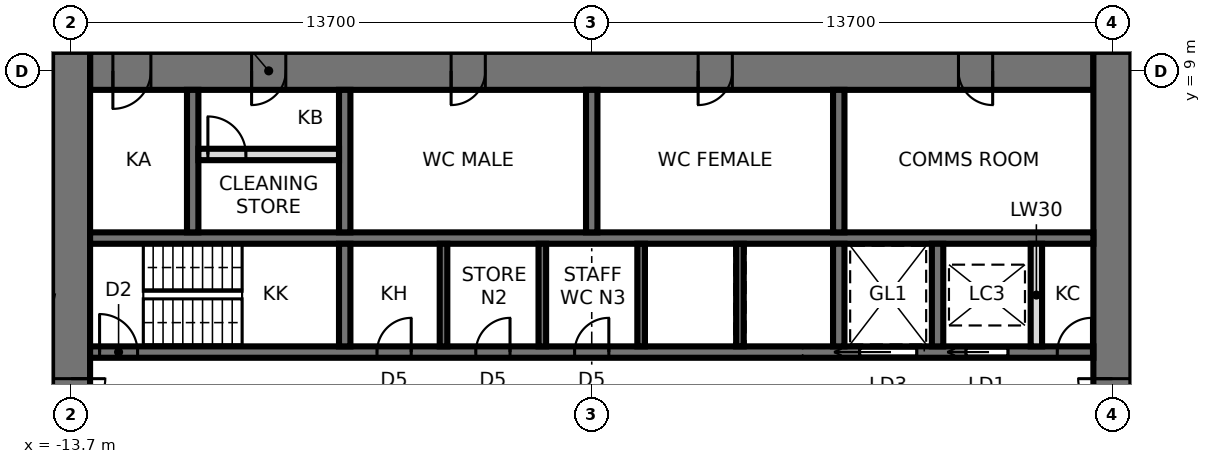
"""IFC4 building model, lengths in metres.
Left out: names, types, materials, properties, quantities, classifications, styles, units other than length and angle.
Written with IfcOpenShell. Run it as: python <this file> out.ifc"""

import sys

from ifc_helpers import new_model, si_unit, direction, frame, frame_2d, origin, place, context, subcontext, project, spatial, rectangle, extrude, element, fill, save


model = new_model("IFC4")
c1 = context("Model", 3, precision=1e-05, world=origin(), true_north=direction((0.0, 1.0)))
c2 = subcontext(c1, "Body", "Model", "MODEL_VIEW")
j1 = project(units=[si_unit("LENGTHUNIT", "METRE"), si_unit("PLANEANGLEUNIT", "RADIAN")], contexts=[c1])
p1 = place(None, origin())
s1 = spatial("IfcSite", under=j1, at=p1, CompositionType="ELEMENT")
p2 = place(p1, origin())
s2 = spatial("IfcBuilding", under=s1, at=p2, CompositionType="ELEMENT")
p3 = place(p2, frame((0.0, 0.0, 215.0)))
s3 = spatial("IfcBuildingStorey", under=s2, at=p3, CompositionType="ELEMENT", Elevation=215.0)
p4 = place(p3, frame((13.2, 9.0, 0.0), z_axis=(0.0, 0.0, 1.0), x_axis=(-1.0, 0.0, 0.0)))
e1 = element("IfcWall", 1, at=p4, inside=s3, PredefinedType="SHEAR", context=c2, shape_type="SweptSolid", body=[
    extrude(rectangle(XDim=26.4, YDim=1.0, at=frame_2d((13.2, 0.0))), origin(), (0.0, 0.0, 1.0), 3.9),
])
p5 = place(p4, frame((2.65, 0.0, 0.0)))
e2 = element("IfcOpeningElement", 2, at=p5, cuts=e1, PredefinedType="OPENING", context=c2, shape_type="SweptSolid", body=[
    extrude(rectangle(XDim=0.9, YDim=2.1, at=frame_2d((0.45, 1.05))), frame((0.0, 0.51, 0.0), z_axis=(0.0, -1.0, 0.0), x_axis=(1.0, 0.0, 0.0)), (0.0, 0.0, 1.0), 1.02),
])
p6 = place(p4, frame((9.5, 0.0, 0.0)))
e3 = element("IfcOpeningElement", 3, at=p6, cuts=e1, PredefinedType="OPENING", context=c2, shape_type="SweptSolid", body=[
    extrude(rectangle(XDim=0.9, YDim=2.1, at=frame_2d((0.45, 1.05))), frame((0.0, 0.51, 0.0), z_axis=(0.0, -1.0, 0.0), x_axis=(1.0, 0.0, 0.0)), (0.0, 0.0, 1.0), 1.02),
])
p7 = place(p4, frame((16.0, 0.0, 0.0)))
e4 = element("IfcOpeningElement", 4, at=p7, cuts=e1, PredefinedType="OPENING", context=c2, shape_type="SweptSolid", body=[
    extrude(rectangle(XDim=0.9, YDim=2.1, at=frame_2d((0.45, 1.05))), frame((0.0, 0.51, 0.0), z_axis=(0.0, -1.0, 0.0), x_axis=(1.0, 0.0, 0.0)), (0.0, 0.0, 1.0), 1.02),
])
p8 = place(p4, frame((21.25, 0.0, 0.0)))
e5 = element("IfcOpeningElement", 5, at=p8, cuts=e1, PredefinedType="OPENING", context=c2, shape_type="SweptSolid", body=[
    extrude(rectangle(XDim=0.9, YDim=2.1, at=frame_2d((0.45, 1.05))), frame((0.0, 0.51, 0.0), z_axis=(0.0, -1.0, 0.0), x_axis=(1.0, 0.0, 0.0)), (0.0, 0.0, 1.0), 1.02),
])
p9 = place(p4, frame((24.8, 0.0, 0.0)))
e6 = element("IfcOpeningElement", 6, at=p9, cuts=e1, PredefinedType="OPENING", context=c2, shape_type="SweptSolid", body=[
    extrude(rectangle(XDim=1.0, YDim=2.1, at=frame_2d((0.5, 1.05))), frame((0.0, 0.51, 0.0), z_axis=(0.0, -1.0, 0.0), x_axis=(1.0, 0.0, 0.0)), (0.0, 0.0, 1.0), 1.02),
])
p10 = place(p3, frame((13.7, -9.5, 0.0), z_axis=(0.0, 0.0, 1.0), x_axis=(0.0, 1.0, 0.0)))
e7 = element("IfcWall", 7, at=p10, inside=s3, PredefinedType="SHEAR", context=c2, shape_type="SweptSolid", body=[
    extrude(rectangle(XDim=19.0, YDim=1.0, at=frame_2d((9.5, 0.0))), origin(), (0.0, 0.0, 1.0), 3.9),
])
p11 = place(p10, frame((8.6, 0.0, 0.0)))
e8 = element("IfcOpeningElement", 8, at=p11, cuts=e7, PredefinedType="OPENING", context=c2, shape_type="SweptSolid", body=[
    extrude(rectangle(XDim=1.8, YDim=2.4, at=frame_2d((0.9, 1.2))), frame((0.0, 0.51, 0.0), z_axis=(0.0, -1.0, 0.0), x_axis=(1.0, 0.0, 0.0)), (0.0, 0.0, 1.0), 1.02),
])
p12 = place(p3, frame((-13.7, 9.5, 0.0), z_axis=(0.0, 0.0, 1.0), x_axis=(0.0, -1.0, 0.0)))
e9 = element("IfcWall", 9, at=p12, inside=s3, PredefinedType="SHEAR", context=c2, shape_type="SweptSolid", body=[
    extrude(rectangle(XDim=19.0, YDim=1.0, at=frame_2d((9.5, 0.0))), origin(), (0.0, 0.0, 1.0), 3.9),
])
p13 = place(p12, frame((8.6, 0.0, 0.0)))
e10 = element("IfcOpeningElement", 10, at=p13, cuts=e9, PredefinedType="OPENING", context=c2, shape_type="SweptSolid", body=[
    extrude(rectangle(XDim=1.8, YDim=2.4, at=frame_2d((0.9, 1.2))), frame((0.0, 0.51, 0.0), z_axis=(0.0, -1.0, 0.0), x_axis=(1.0, 0.0, 0.0)), (0.0, 0.0, 1.0), 1.02),
])
p14 = place(p3, frame((-13.2, 1.6, 0.0), z_axis=(0.0, 0.0, 1.0), x_axis=(1.0, 0.0, 0.0)))
e11 = element("IfcWall", 11, at=p14, inside=s3, PredefinedType="SHEAR", context=c2, shape_type="SweptSolid", body=[
    extrude(rectangle(XDim=26.4, YDim=0.3, at=frame_2d((13.2, 0.0))), origin(), (0.0, 0.0, 1.0), 3.9),
])
p15 = place(p14, frame((0.25, 0.0, 0.0)))
e12 = element("IfcOpeningElement", 12, at=p15, cuts=e11, PredefinedType="OPENING", context=c2, shape_type="SweptSolid", body=[
    extrude(rectangle(XDim=1.0, YDim=2.1, at=frame_2d((0.5, 1.05))), frame((0.0, 0.16, 0.0), z_axis=(0.0, -1.0, 0.0), x_axis=(1.0, 0.0, 0.0)), (0.0, 0.0, 1.0), 0.32),
])
p16 = place(p14, frame((23.05, 0.0, 0.0)))
e13 = element("IfcOpeningElement", 13, at=p16, cuts=e11, PredefinedType="OPENING", context=c2, shape_type="SweptSolid", body=[
    extrude(rectangle(XDim=1.1, YDim=2.3, at=frame_2d((0.55, 1.15))), frame((0.0, 0.16, 0.0), z_axis=(0.0, -1.0, 0.0), x_axis=(1.0, 0.0, 0.0)), (0.0, 0.0, 1.0), 0.32),
])
p17 = place(p14, frame((20.25, 0.0, 0.0)))
e14 = element("IfcOpeningElement", 14, at=p17, cuts=e11, PredefinedType="OPENING", context=c2, shape_type="SweptSolid", body=[
    extrude(rectangle(XDim=1.5, YDim=2.4, at=frame_2d((0.75, 1.2))), frame((0.0, 0.16, 0.0), z_axis=(0.0, -1.0, 0.0), x_axis=(1.0, 0.0, 0.0)), (0.0, 0.0, 1.0), 0.32),
])
p18 = place(p14, frame((7.55, 0.0, 0.0)))
e15 = element("IfcOpeningElement", 15, at=p18, cuts=e11, PredefinedType="OPENING", context=c2, shape_type="SweptSolid", body=[
    extrude(rectangle(XDim=0.9, YDim=2.1, at=frame_2d((0.45, 1.05))), frame((0.0, 0.16, 0.0), z_axis=(0.0, -1.0, 0.0), x_axis=(1.0, 0.0, 0.0)), (0.0, 0.0, 1.0), 0.32),
])
p19 = place(p14, frame((10.15, 0.0, 0.0)))
e16 = element("IfcOpeningElement", 16, at=p19, cuts=e11, PredefinedType="OPENING", context=c2, shape_type="SweptSolid", body=[
    extrude(rectangle(XDim=0.9, YDim=2.1, at=frame_2d((0.45, 1.05))), frame((0.0, 0.16, 0.0), z_axis=(0.0, -1.0, 0.0), x_axis=(1.0, 0.0, 0.0)), (0.0, 0.0, 1.0), 0.32),
])
p20 = place(p14, frame((12.75, 0.0, 0.0)))
e17 = element("IfcOpeningElement", 17, at=p20, cuts=e11, PredefinedType="OPENING", context=c2, shape_type="SweptSolid", body=[
    extrude(rectangle(XDim=0.9, YDim=2.1, at=frame_2d((0.45, 1.05))), frame((0.0, 0.16, 0.0), z_axis=(0.0, -1.0, 0.0), x_axis=(1.0, 0.0, 0.0)), (0.0, 0.0, 1.0), 0.32),
])
p21 = place(p14, frame((25.45, 0.0, 0.0)))
e18 = element("IfcOpeningElement", 18, at=p21, cuts=e11, PredefinedType="OPENING", context=c2, shape_type="SweptSolid", body=[
    extrude(rectangle(XDim=0.9, YDim=2.1, at=frame_2d((0.45, 1.05))), frame((0.0, 0.16, 0.0), z_axis=(0.0, -1.0, 0.0), x_axis=(1.0, 0.0, 0.0)), (0.0, 0.0, 1.0), 0.32),
])
p22 = place(p3, frame((-13.2, 4.6, 0.0), z_axis=(0.0, 0.0, 1.0), x_axis=(1.0, 0.0, 0.0)))
e19 = element("IfcWall", 19, at=p22, inside=s3, PredefinedType="SHEAR", context=c2, shape_type="SweptSolid", body=[
    extrude(rectangle(XDim=26.4, YDim=0.3, at=frame_2d((13.2, 0.0))), origin(), (0.0, 0.0, 1.0), 3.9),
])
p23 = place(p3, frame((-6.5, 1.75, 0.0), z_axis=(0.0, 0.0, 1.0), x_axis=(0.0, 1.0, 0.0)))
e20 = element("IfcWall", 20, at=p23, inside=s3, PredefinedType="SHEAR", context=c2, shape_type="SweptSolid", body=[
    extrude(rectangle(XDim=2.7, YDim=0.3, at=frame_2d((1.35, 0.0))), origin(), (0.0, 0.0, 1.0), 3.9),
])
p24 = place(p3, frame((-6.5, 4.75, 0.0), z_axis=(0.0, 0.0, 1.0), x_axis=(0.0, 1.0, 0.0)))
e21 = element("IfcWall", 21, at=p24, inside=s3, PredefinedType="SHEAR", context=c2, shape_type="SweptSolid", body=[
    extrude(rectangle(XDim=3.75, YDim=0.3, at=frame_2d((1.875, 0.0))), origin(), (0.0, 0.0, 1.0), 3.9),
])
p25 = place(p3, frame((6.5, 1.75, 0.0), z_axis=(0.0, 0.0, 1.0), x_axis=(0.0, 1.0, 0.0)))
e22 = element("IfcWall", 22, at=p25, inside=s3, PredefinedType="SHEAR", context=c2, shape_type="SweptSolid", body=[
    extrude(rectangle(XDim=2.7, YDim=0.3, at=frame_2d((1.35, 0.0))), origin(), (0.0, 0.0, 1.0), 3.9),
])
p26 = place(p3, frame((6.5, 4.75, 0.0), z_axis=(0.0, 0.0, 1.0), x_axis=(0.0, 1.0, 0.0)))
e23 = element("IfcWall", 23, at=p26, inside=s3, PredefinedType="SHEAR", context=c2, shape_type="SweptSolid", body=[
    extrude(rectangle(XDim=3.75, YDim=0.3, at=frame_2d((1.875, 0.0))), origin(), (0.0, 0.0, 1.0), 3.9),
])
for number, where, z_axis, x_axis in (
    (24, (-3.9, 1.75, 0.0), (0.0, 0.0, 1.0), (0.0, 1.0, 0.0)),
    (25, (-1.3, 1.75, 0.0), (0.0, 0.0, 1.0), (0.0, 1.0, 0.0)),
    (26, (1.3, 1.75, 0.0), (0.0, 0.0, 1.0), (0.0, 1.0, 0.0)),
    (27, (3.9, 1.75, 0.0), (0.0, 0.0, 1.0), (0.0, 1.0, 0.0)),
):
    element("IfcWall", number, at=place(p3, frame(where, z_axis=z_axis, x_axis=x_axis)), inside=s3, PredefinedType="SHEAR", context=c2, shape_type="SweptSolid", body=[
        extrude(rectangle(XDim=2.7, YDim=0.2, at=frame_2d((1.35, 0.0))), origin(), (0.0, 0.0, 1.0), 3.9),
    ])
for number, where, z_axis, x_axis in (
    (28, (0.0, 4.75, 0.0), (0.0, 0.0, 1.0), (0.0, 1.0, 0.0)),
    (29, (-10.5, 4.75, 0.0), (0.0, 0.0, 1.0), (0.0, 1.0, 0.0)),
):
    element("IfcWall", number, at=place(p3, frame(where, z_axis=z_axis, x_axis=x_axis)), inside=s3, PredefinedType="SHEAR", context=c2, shape_type="SweptSolid", body=[
        extrude(rectangle(XDim=3.75, YDim=0.3, at=frame_2d((1.875, 0.0))), origin(), (0.0, 0.0, 1.0), 3.9),
    ])
p27 = place(p3, frame((9.1, 1.75, 0.0), z_axis=(0.0, 0.0, 1.0), x_axis=(0.0, 1.0, 0.0)))
e30 = element("IfcWall", 30, at=p27, inside=s3, PredefinedType="SHEAR", context=c2, shape_type="SweptSolid", body=[
    extrude(rectangle(XDim=2.7, YDim=0.3, at=frame_2d((1.35, 0.0))), origin(), (0.0, 0.0, 1.0), 3.9),
])
p28 = place(p3, frame((-10.35, 6.8, 0.0), z_axis=(0.0, 0.0, 1.0), x_axis=(1.0, 0.0, 0.0)))
e31 = element("IfcWall", 31, at=p28, inside=s3, PredefinedType="PARTITIONING", context=c2, shape_type="SweptSolid", body=[
    extrude(rectangle(XDim=3.7, YDim=0.3, at=frame_2d((1.85, 0.0))), origin(), (0.0, 0.0, 1.0), 3.74),
])
p29 = place(p28, frame((0.25, 0.0, 0.0)))
e32 = element("IfcOpeningElement", 32, at=p29, cuts=e31, PredefinedType="OPENING", context=c2, shape_type="SweptSolid", body=[
    extrude(rectangle(XDim=1.0, YDim=2.4, at=frame_2d((0.5, 1.2))), frame((0.0, 0.16, 0.0), z_axis=(0.0, -1.0, 0.0), x_axis=(1.0, 0.0, 0.0)), (0.0, 0.0, 1.0), 0.32),
])
p30 = place(p3, frame((11.7, 1.75, 0.0), z_axis=(0.0, 0.0, 1.0), x_axis=(0.0, 1.0, 0.0)))
e33 = element("IfcWall", 33, at=p30, inside=s3, PredefinedType="SOLIDWALL", context=c2, shape_type="SweptSolid", body=[
    extrude(rectangle(XDim=2.7, YDim=0.3, at=frame_2d((1.35, 0.0))), origin(), (0.0, 0.0, 1.0), 3.74),
])
p31 = place(p3, frame((-14.2, 3.018, 0.0), z_axis=(0.0, 0.0, 1.0), x_axis=(-0.978146067863, 0.207918902279, 0.0)))
e34 = element("IfcWall", 34, at=p31, inside=s3, PredefinedType="PARTITIONING", context=c2, shape_type="SweptSolid", body=[
    extrude(rectangle(XDim=9.321, YDim=0.12, at=frame_2d((4.66, 0.0))), origin(), (0.0, 0.0, 1.0), 3.74),
])
p32 = place(p31, frame((4.411, 0.0, 0.0)))
e35 = element("IfcOpeningElement", 35, at=p32, cuts=e34, PredefinedType="OPENING", context=c2, shape_type="SweptSolid", body=[
    extrude(rectangle(XDim=1.0, YDim=2.4, at=frame_2d((0.5, 1.2))), frame((0.0, 0.07, 0.0), z_axis=(0.0, -1.0, 0.0), x_axis=(1.0, 0.0, 0.0)), (0.0, 0.0, 1.0), 0.14),
])
p33 = place(p13, origin())
e36 = element("IfcDoor", 36, at=p33, inside=s3, OperationType="DOUBLE_DOOR_SINGLE_SWING", PredefinedType="DOOR", context=c2, shape_type="SweptSolid", body=[
    extrude(rectangle(XDim=1.72, YDim=2.36, at=frame_2d((0.9, 1.18))), frame((0.0, 0.025, 0.0), z_axis=(0.0, -1.0, 0.0), x_axis=(1.0, 0.0, 0.0)), (0.0, 0.0, 1.0), 0.05),
    extrude(rectangle(XDim=0.04, YDim=2.4, at=frame_2d((0.02, 1.2))), frame((0.0, 0.25, 0.0), z_axis=(0.0, -1.0, 0.0), x_axis=(1.0, 0.0, 0.0)), (0.0, 0.0, 1.0), 0.5),
    extrude(rectangle(XDim=0.04, YDim=2.4, at=frame_2d((1.78, 1.2))), frame((0.0, 0.25, 0.0), z_axis=(0.0, -1.0, 0.0), x_axis=(1.0, 0.0, 0.0)), (0.0, 0.0, 1.0), 0.5),
    extrude(rectangle(XDim=1.72, YDim=0.04, at=frame_2d((0.9, 2.38))), frame((0.0, 0.25, 0.0), z_axis=(0.0, -1.0, 0.0), x_axis=(1.0, 0.0, 0.0)), (0.0, 0.0, 1.0), 0.5),
])
fill(e10, e36)
p34 = place(p11, origin())
e37 = element("IfcDoor", 37, at=p34, inside=s3, OperationType="DOUBLE_DOOR_SINGLE_SWING", PredefinedType="DOOR", context=c2, shape_type="SweptSolid", body=[
    extrude(rectangle(XDim=1.72, YDim=2.36, at=frame_2d((0.9, 1.18))), frame((0.0, 0.025, 0.0), z_axis=(0.0, -1.0, 0.0), x_axis=(1.0, 0.0, 0.0)), (0.0, 0.0, 1.0), 0.05),
    extrude(rectangle(XDim=0.04, YDim=2.4, at=frame_2d((0.02, 1.2))), frame((0.0, 0.25, 0.0), z_axis=(0.0, -1.0, 0.0), x_axis=(1.0, 0.0, 0.0)), (0.0, 0.0, 1.0), 0.5),
    extrude(rectangle(XDim=0.04, YDim=2.4, at=frame_2d((1.78, 1.2))), frame((0.0, 0.25, 0.0), z_axis=(0.0, -1.0, 0.0), x_axis=(1.0, 0.0, 0.0)), (0.0, 0.0, 1.0), 0.5),
    extrude(rectangle(XDim=1.72, YDim=0.04, at=frame_2d((0.9, 2.38))), frame((0.0, 0.25, 0.0), z_axis=(0.0, -1.0, 0.0), x_axis=(1.0, 0.0, 0.0)), (0.0, 0.0, 1.0), 0.5),
])
fill(e8, e37)
p35 = place(p15, origin())
e38 = element("IfcDoor", 38, at=p35, inside=s3, OperationType="SINGLE_SWING_LEFT", PredefinedType="DOOR", context=c2, shape_type="SweptSolid", body=[
    extrude(rectangle(XDim=1.0, YDim=2.1, at=frame_2d((0.5, 1.05))), frame((0.0, 0.025, 0.0), z_axis=(0.0, -1.0, 0.0), x_axis=(1.0, 0.0, 0.0)), (0.0, 0.0, 1.0), 0.05),
])
fill(e12, e38)
p36 = place(p16, origin())
e39 = element("IfcDoor", 39, at=p36, inside=s3, OperationType="SLIDING_TO_LEFT", PredefinedType="DOOR", context=c2, shape_type="SweptSolid", body=[
    extrude(rectangle(XDim=1.1, YDim=2.3, at=frame_2d((0.55, 1.15))), frame((0.0, 0.025, 0.0), z_axis=(0.0, -1.0, 0.0), x_axis=(1.0, 0.0, 0.0)), (0.0, 0.0, 1.0), 0.05),
])
fill(e13, e39)
p37 = place(p17, origin())
e40 = element("IfcDoor", 40, at=p37, inside=s3, OperationType="SLIDING_TO_LEFT", PredefinedType="DOOR", context=c2, shape_type="SweptSolid", body=[
    extrude(rectangle(XDim=1.5, YDim=2.4, at=frame_2d((0.75, 1.2))), frame((0.0, 0.025, 0.0), z_axis=(0.0, -1.0, 0.0), x_axis=(1.0, 0.0, 0.0)), (0.0, 0.0, 1.0), 0.05),
])
fill(e14, e40)
p38 = place(p18, origin())
e41 = element("IfcDoor", 41, at=p38, inside=s3, OperationType="SINGLE_SWING_RIGHT", PredefinedType="DOOR", context=c2, shape_type="SweptSolid", body=[
    extrude(rectangle(XDim=0.9, YDim=2.1, at=frame_2d((0.45, 1.05))), frame((0.0, 0.025, 0.0), z_axis=(0.0, -1.0, 0.0), x_axis=(1.0, 0.0, 0.0)), (0.0, 0.0, 1.0), 0.05),
])
fill(e15, e41)
p39 = place(p19, origin())
e42 = element("IfcDoor", 42, at=p39, inside=s3, OperationType="SINGLE_SWING_RIGHT", PredefinedType="DOOR", context=c2, shape_type="SweptSolid", body=[
    extrude(rectangle(XDim=0.9, YDim=2.1, at=frame_2d((0.45, 1.05))), frame((0.0, 0.025, 0.0), z_axis=(0.0, -1.0, 0.0), x_axis=(1.0, 0.0, 0.0)), (0.0, 0.0, 1.0), 0.05),
])
fill(e16, e42)
p40 = place(p20, origin())
e43 = element("IfcDoor", 43, at=p40, inside=s3, OperationType="SINGLE_SWING_RIGHT", PredefinedType="DOOR", context=c2, shape_type="SweptSolid", body=[
    extrude(rectangle(XDim=0.9, YDim=2.1, at=frame_2d((0.45, 1.05))), frame((0.0, 0.025, 0.0), z_axis=(0.0, -1.0, 0.0), x_axis=(1.0, 0.0, 0.0)), (0.0, 0.0, 1.0), 0.05),
])
fill(e17, e43)
p41 = place(p21, origin())
e44 = element("IfcDoor", 44, at=p41, inside=s3, OperationType="SINGLE_SWING_RIGHT", PredefinedType="DOOR", context=c2, shape_type="SweptSolid", body=[
    extrude(rectangle(XDim=0.9, YDim=2.1, at=frame_2d((0.45, 1.05))), frame((0.0, 0.025, 0.0), z_axis=(0.0, -1.0, 0.0), x_axis=(1.0, 0.0, 0.0)), (0.0, 0.0, 1.0), 0.05),
])
fill(e18, e44)
p42 = place(p5, origin())
e45 = element("IfcDoor", 45, at=p42, inside=s3, OperationType="SINGLE_SWING_LEFT", PredefinedType="DOOR", context=c2, shape_type="SweptSolid", body=[
    extrude(rectangle(XDim=0.82, YDim=2.06, at=frame_2d((0.45, 1.03))), frame((0.0, 0.025, 0.0), z_axis=(0.0, -1.0, 0.0), x_axis=(1.0, 0.0, 0.0)), (0.0, 0.0, 1.0), 0.05),
    extrude(rectangle(XDim=0.04, YDim=2.1, at=frame_2d((0.02, 1.05))), frame((0.0, 0.25, 0.0), z_axis=(0.0, -1.0, 0.0), x_axis=(1.0, 0.0, 0.0)), (0.0, 0.0, 1.0), 0.5),
    extrude(rectangle(XDim=0.04, YDim=2.1, at=frame_2d((0.88, 1.05))), frame((0.0, 0.25, 0.0), z_axis=(0.0, -1.0, 0.0), x_axis=(1.0, 0.0, 0.0)), (0.0, 0.0, 1.0), 0.5),
    extrude(rectangle(XDim=0.82, YDim=0.04, at=frame_2d((0.45, 2.08))), frame((0.0, 0.25, 0.0), z_axis=(0.0, -1.0, 0.0), x_axis=(1.0, 0.0, 0.0)), (0.0, 0.0, 1.0), 0.5),
])
fill(e2, e45)
p43 = place(p6, origin())
e46 = element("IfcDoor", 46, at=p43, inside=s3, OperationType="SINGLE_SWING_RIGHT", PredefinedType="DOOR", context=c2, shape_type="SweptSolid", body=[
    extrude(rectangle(XDim=0.82, YDim=2.06, at=frame_2d((0.45, 1.03))), frame((0.0, 0.025, 0.0), z_axis=(0.0, -1.0, 0.0), x_axis=(1.0, 0.0, 0.0)), (0.0, 0.0, 1.0), 0.05),
    extrude(rectangle(XDim=0.04, YDim=2.1, at=frame_2d((0.02, 1.05))), frame((0.0, 0.25, 0.0), z_axis=(0.0, -1.0, 0.0), x_axis=(1.0, 0.0, 0.0)), (0.0, 0.0, 1.0), 0.5),
    extrude(rectangle(XDim=0.04, YDim=2.1, at=frame_2d((0.88, 1.05))), frame((0.0, 0.25, 0.0), z_axis=(0.0, -1.0, 0.0), x_axis=(1.0, 0.0, 0.0)), (0.0, 0.0, 1.0), 0.5),
    extrude(rectangle(XDim=0.82, YDim=0.04, at=frame_2d((0.45, 2.08))), frame((0.0, 0.25, 0.0), z_axis=(0.0, -1.0, 0.0), x_axis=(1.0, 0.0, 0.0)), (0.0, 0.0, 1.0), 0.5),
])
fill(e3, e46)
p44 = place(p7, origin())
e47 = element("IfcDoor", 47, at=p44, inside=s3, OperationType="SINGLE_SWING_RIGHT", PredefinedType="DOOR", context=c2, shape_type="SweptSolid", body=[
    extrude(rectangle(XDim=0.82, YDim=2.06, at=frame_2d((0.45, 1.03))), frame((0.0, 0.025, 0.0), z_axis=(0.0, -1.0, 0.0), x_axis=(1.0, 0.0, 0.0)), (0.0, 0.0, 1.0), 0.05),
    extrude(rectangle(XDim=0.04, YDim=2.1, at=frame_2d((0.02, 1.05))), frame((0.0, 0.25, 0.0), z_axis=(0.0, -1.0, 0.0), x_axis=(1.0, 0.0, 0.0)), (0.0, 0.0, 1.0), 0.5),
    extrude(rectangle(XDim=0.04, YDim=2.1, at=frame_2d((0.88, 1.05))), frame((0.0, 0.25, 0.0), z_axis=(0.0, -1.0, 0.0), x_axis=(1.0, 0.0, 0.0)), (0.0, 0.0, 1.0), 0.5),
    extrude(rectangle(XDim=0.82, YDim=0.04, at=frame_2d((0.45, 2.08))), frame((0.0, 0.25, 0.0), z_axis=(0.0, -1.0, 0.0), x_axis=(1.0, 0.0, 0.0)), (0.0, 0.0, 1.0), 0.5),
])
fill(e4, e47)
p45 = place(p8, origin())
e48 = element("IfcDoor", 48, at=p45, inside=s3, OperationType="SINGLE_SWING_RIGHT", PredefinedType="DOOR", context=c2, shape_type="SweptSolid", body=[
    extrude(rectangle(XDim=0.82, YDim=2.06, at=frame_2d((0.45, 1.03))), frame((0.0, 0.025, 0.0), z_axis=(0.0, -1.0, 0.0), x_axis=(1.0, 0.0, 0.0)), (0.0, 0.0, 1.0), 0.05),
    extrude(rectangle(XDim=0.04, YDim=2.1, at=frame_2d((0.02, 1.05))), frame((0.0, 0.25, 0.0), z_axis=(0.0, -1.0, 0.0), x_axis=(1.0, 0.0, 0.0)), (0.0, 0.0, 1.0), 0.5),
    extrude(rectangle(XDim=0.04, YDim=2.1, at=frame_2d((0.88, 1.05))), frame((0.0, 0.25, 0.0), z_axis=(0.0, -1.0, 0.0), x_axis=(1.0, 0.0, 0.0)), (0.0, 0.0, 1.0), 0.5),
    extrude(rectangle(XDim=0.82, YDim=0.04, at=frame_2d((0.45, 2.08))), frame((0.0, 0.25, 0.0), z_axis=(0.0, -1.0, 0.0), x_axis=(1.0, 0.0, 0.0)), (0.0, 0.0, 1.0), 0.5),
])
fill(e5, e48)
p46 = place(p9, origin())
e49 = element("IfcDoor", 49, at=p46, inside=s3, OperationType="SINGLE_SWING_RIGHT", PredefinedType="DOOR", context=c2, shape_type="SweptSolid", body=[
    extrude(rectangle(XDim=0.92, YDim=2.06, at=frame_2d((0.5, 1.03))), frame((0.0, 0.025, 0.0), z_axis=(0.0, -1.0, 0.0), x_axis=(1.0, 0.0, 0.0)), (0.0, 0.0, 1.0), 0.05),
    extrude(rectangle(XDim=0.04, YDim=2.1, at=frame_2d((0.02, 1.05))), frame((0.0, 0.25, 0.0), z_axis=(0.0, -1.0, 0.0), x_axis=(1.0, 0.0, 0.0)), (0.0, 0.0, 1.0), 0.5),
    extrude(rectangle(XDim=0.04, YDim=2.1, at=frame_2d((0.98, 1.05))), frame((0.0, 0.25, 0.0), z_axis=(0.0, -1.0, 0.0), x_axis=(1.0, 0.0, 0.0)), (0.0, 0.0, 1.0), 0.5),
    extrude(rectangle(XDim=0.92, YDim=0.04, at=frame_2d((0.5, 2.08))), frame((0.0, 0.25, 0.0), z_axis=(0.0, -1.0, 0.0), x_axis=(1.0, 0.0, 0.0)), (0.0, 0.0, 1.0), 0.5),
])
fill(e6, e49)
p47 = place(p29, origin())
e50 = element("IfcDoor", 50, at=p47, inside=s3, OperationType="SINGLE_SWING_LEFT", PredefinedType="DOOR", context=c2, shape_type="SweptSolid", body=[
    extrude(rectangle(XDim=1.0, YDim=2.4, at=frame_2d((0.5, 1.2))), frame((0.0, 0.025, 0.0), z_axis=(0.0, -1.0, 0.0), x_axis=(1.0, 0.0, 0.0)), (0.0, 0.0, 1.0), 0.05),
])
fill(e32, e50)
save(model, sys.argv[1])
